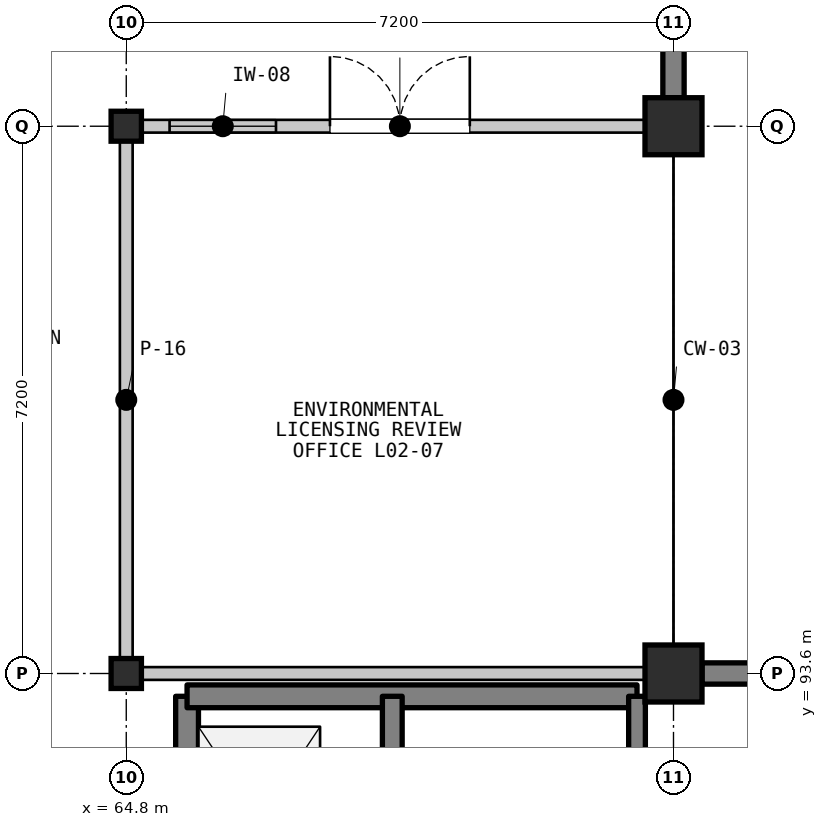
"""IFC4 building model, lengths in metres.
Left out: names, types, materials, properties, quantities, classifications, styles, units other than length and angle.
Written with IfcOpenShell. Run it as: python <this file> out.ifc"""

import sys

from ifc_helpers import new_model, si_unit, direction, frame, frame_2d, origin, origin_2d, place, context, subcontext, project, spatial, rectangle, i_section, extrude, element, fill, save


model = new_model("IFC4")
c1 = context("Model", 3, precision=1e-05, world=origin(), true_north=direction((0.0, 1.0)))
c2 = subcontext(c1, "Body", "Model", "MODEL_VIEW")
j1 = project(units=[si_unit("LENGTHUNIT", "METRE"), si_unit("PLANEANGLEUNIT", "RADIAN")], contexts=[c1])
p1 = place(None, origin())
s1 = spatial("IfcSite", under=j1, at=p1, CompositionType="ELEMENT")
p2 = place(p1, origin())
s2 = spatial("IfcBuilding", under=s1, at=p2, CompositionType="ELEMENT")
p3 = place(p2, frame((0.0, 0.0, 5.4)))
s3 = spatial("IfcBuildingStorey", under=s2, at=p3, CompositionType="ELEMENT", Elevation=5.4)
for number, where, z_axis, x_axis in (
    (1, (64.8, 93.6, 0.0), (0.0, 0.0, 1.0), (1.0, 0.0, 0.0)),
    (2, (64.8, 100.8, 0.0), (0.0, 0.0, 1.0), (1.0, 0.0, 0.0)),
):
    element("IfcColumn", number, at=place(p3, frame(where, z_axis=z_axis, x_axis=x_axis)), inside=s3, PredefinedType="COLUMN", context=c2, shape_type="SweptSolid", body=[
        extrude(i_section(OverallWidth=0.399, OverallDepth=0.394, WebThickness=0.023, FlangeThickness=0.037, FilletRadius=0.015, at=origin_2d()), origin(), (0.0, 0.0, 1.0), 4.5),
    ])
for number, where, z_axis, x_axis in (
    (3, (72.0, 93.6, 0.0), (0.0, 0.0, 1.0), (1.0, 0.0, 0.0)),
    (4, (72.0, 100.8, 0.0), (0.0, 0.0, 1.0), (1.0, 0.0, 0.0)),
):
    element("IfcColumn", number, at=place(p3, frame(where, z_axis=z_axis, x_axis=x_axis)), inside=s3, PredefinedType="COLUMN", context=c2, shape_type="SweptSolid", body=[
        extrude(rectangle(XDim=0.75, YDim=0.75, at=origin_2d()), origin(), (0.0, 0.0, 1.0), 4.5),
    ])
p4 = place(p3, frame((72.0, 107.625, 0.0), z_axis=(0.0, 0.0, 1.0), x_axis=(0.0, -1.0, 0.0)))
e5 = element("IfcWall", 5, at=p4, inside=s3, PredefinedType="SOLIDWALL", context=c2, shape_type="SweptSolid", body=[
    extrude(rectangle(XDim=6.45, YDim=0.28, at=frame_2d((3.225, 0.0))), origin(), (0.0, 0.0, 1.0), 3.767),
])
p5 = place(p3, frame((72.375, 93.6, 0.0), z_axis=(0.0, 0.0, 1.0), x_axis=(1.0, 0.0, 0.0)))
e6 = element("IfcWall", 6, at=p5, inside=s3, PredefinedType="SOLIDWALL", context=c2, shape_type="SweptSolid", body=[
    extrude(rectangle(XDim=6.45, YDim=0.28, at=frame_2d((3.225, 0.0))), origin(), (0.0, 0.0, 1.0), 3.698),
])
p6 = place(p3, frame((65.6, 88.98, 0.0), z_axis=(0.0, 0.0, 1.0), x_axis=(0.0, 1.0, 0.0)))
e7 = element("IfcWall", 7, at=p6, inside=s3, PredefinedType="SHEAR", context=c2, shape_type="SweptSolid", body=[
    extrude(rectangle(XDim=4.32, YDim=0.3, at=frame_2d((2.16, 0.0))), origin(), (0.0, 0.0, 1.0), 4.3),
])
p7 = place(p3, frame((65.6, 93.3, 0.0), z_axis=(0.0, 0.0, 1.0), x_axis=(1.0, 0.0, 0.0)))
e8 = element("IfcWall", 8, at=p7, inside=s3, PredefinedType="SHEAR", context=c2, shape_type="SweptSolid", body=[
    extrude(rectangle(XDim=5.92, YDim=0.3, at=frame_2d((2.96, 0.0))), origin(), (0.0, 0.0, 1.0), 4.3),
])
p8 = place(p3, frame((68.3, 93.3, 0.0), z_axis=(0.0, 0.0, 1.0), x_axis=(0.0, -1.0, 0.0)))
e9 = element("IfcWall", 9, at=p8, inside=s3, PredefinedType="SHEAR", context=c2, shape_type="SweptSolid", body=[
    extrude(rectangle(XDim=4.32, YDim=0.26, at=frame_2d((2.16, 0.0))), origin(), (0.0, 0.0, 1.0), 4.3),
])
p9 = place(p8, frame((1.0, 0.0, 0.0)))
e10 = element("IfcOpeningElement", 10, at=p9, cuts=e9, PredefinedType="OPENING", context=c2, shape_type="SweptSolid", body=[
    extrude(rectangle(XDim=1.2, YDim=2.15, at=frame_2d((0.6, 1.075))), frame((0.0, 0.14, 0.0), z_axis=(0.0, -1.0, 0.0), x_axis=(1.0, 0.0, 0.0)), (0.0, 0.0, 1.0), 0.28),
])
p10 = place(p8, frame((3.325, 0.0, 0.0)))
e11 = element("IfcOpeningElement", 11, at=p10, cuts=e9, PredefinedType="OPENING", context=c2, shape_type="SweptSolid", body=[
    extrude(rectangle(XDim=0.85, YDim=2.05, at=frame_2d((0.425, 1.025))), frame((0.0, 0.14, 0.0), z_axis=(0.0, -1.0, 0.0), x_axis=(1.0, 0.0, 0.0)), (0.0, 0.0, 1.0), 0.28),
])
p11 = place(p3, frame((71.52, 93.3, 0.0), z_axis=(0.0, 0.0, 1.0), x_axis=(0.0, -1.0, 0.0)))
e12 = element("IfcWall", 12, at=p11, inside=s3, PredefinedType="SHEAR", context=c2, shape_type="SweptSolid", body=[
    extrude(rectangle(XDim=4.45, YDim=0.22, at=frame_2d((2.225, 0.0))), origin(), (0.0, 0.0, 1.0), 4.3),
])
p12 = place(p11, frame((1.55, 0.0, 0.0)))
e13 = element("IfcOpeningElement", 13, at=p12, cuts=e12, PredefinedType="OPENING", context=c2, shape_type="SweptSolid", body=[
    extrude(rectangle(XDim=1.6, YDim=2.2, at=frame_2d((0.8, 1.1))), frame((0.0, 0.12, 0.0), z_axis=(0.0, -1.0, 0.0), x_axis=(1.0, 0.0, 0.0)), (0.0, 0.0, 1.0), 0.24),
])
p13 = place(p3, frame((64.92, 100.8, 0.0), z_axis=(0.0, 0.0, 1.0), x_axis=(1.0, 0.0, 0.0)))
e14 = element("IfcWall", 14, at=p13, inside=s3, PredefinedType="PARTITIONING", context=c2, shape_type="SweptSolid", body=[
    extrude(rectangle(XDim=6.96, YDim=0.168, at=frame_2d((3.48, 0.0))), origin(), (0.0, 0.0, 1.0), 3.688),
])
p14 = place(p13, frame((2.56, 0.0, 0.0)))
e15 = element("IfcOpeningElement", 15, at=p14, cuts=e14, PredefinedType="OPENING", context=c2, shape_type="SweptSolid", body=[
    extrude(rectangle(XDim=1.84, YDim=2.36, at=frame_2d((0.92, 1.18))), frame((0.0, 0.094, 0.0), z_axis=(0.0, -1.0, 0.0), x_axis=(1.0, 0.0, 0.0)), (0.0, 0.0, 1.0), 0.188),
])
p15 = place(p13, frame((0.45, 0.0, 1.05)))
e16 = element("IfcOpeningElement", 16, at=p15, cuts=e14, PredefinedType="OPENING", context=c2, shape_type="SweptSolid", body=[
    extrude(rectangle(XDim=1.4, YDim=1.2, at=frame_2d((0.7, 0.6))), frame((0.0, 0.094, 0.0), z_axis=(0.0, -1.0, 0.0), x_axis=(1.0, 0.0, 0.0)), (0.0, 0.0, 1.0), 0.188),
])
for number, where, z_axis, x_axis in (
    (17, (71.88, 93.6, 0.0), (0.0, 0.0, 1.0), (-1.0, 0.0, 0.0)),
    (18, (64.8, 93.72, 0.0), (0.0, 0.0, 1.0), (0.0, 1.0, 0.0)),
):
    element("IfcWall", number, at=place(p3, frame(where, z_axis=z_axis, x_axis=x_axis)), inside=s3, PredefinedType="PARTITIONING", context=c2, shape_type="SweptSolid", body=[
        extrude(rectangle(XDim=6.96, YDim=0.168, at=frame_2d((3.48, 0.0))), origin(), (0.0, 0.0, 1.0), 3.688),
    ])
p16 = place(p14, origin())
e19 = element("IfcDoor", 19, at=p16, inside=s3, OperationType="DOUBLE_DOOR_SINGLE_SWING", PredefinedType="DOOR", context=c2, shape_type="SweptSolid", body=[
    extrude(rectangle(XDim=1.84, YDim=2.36, at=frame_2d((0.92, 1.18))), frame((0.0, 0.025, 0.0), z_axis=(0.0, -1.0, 0.0), x_axis=(1.0, 0.0, 0.0)), (0.0, 0.0, 1.0), 0.05),
])
fill(e15, e19)
p17 = place(p15, origin())
e20 = element("IfcWindow", 20, at=p17, inside=s3, PartitioningType="SINGLE_PANEL", PredefinedType="WINDOW", context=c2, shape_type="SweptSolid", body=[
    extrude(rectangle(XDim=1.4, YDim=1.2, at=frame_2d((0.7, 0.6))), frame((0.0, 0.03, 0.0), z_axis=(0.0, -1.0, 0.0), x_axis=(1.0, 0.0, 0.0)), (0.0, 0.0, 1.0), 0.06),
])
fill(e16, e20)
save(model, sys.argv[1])
